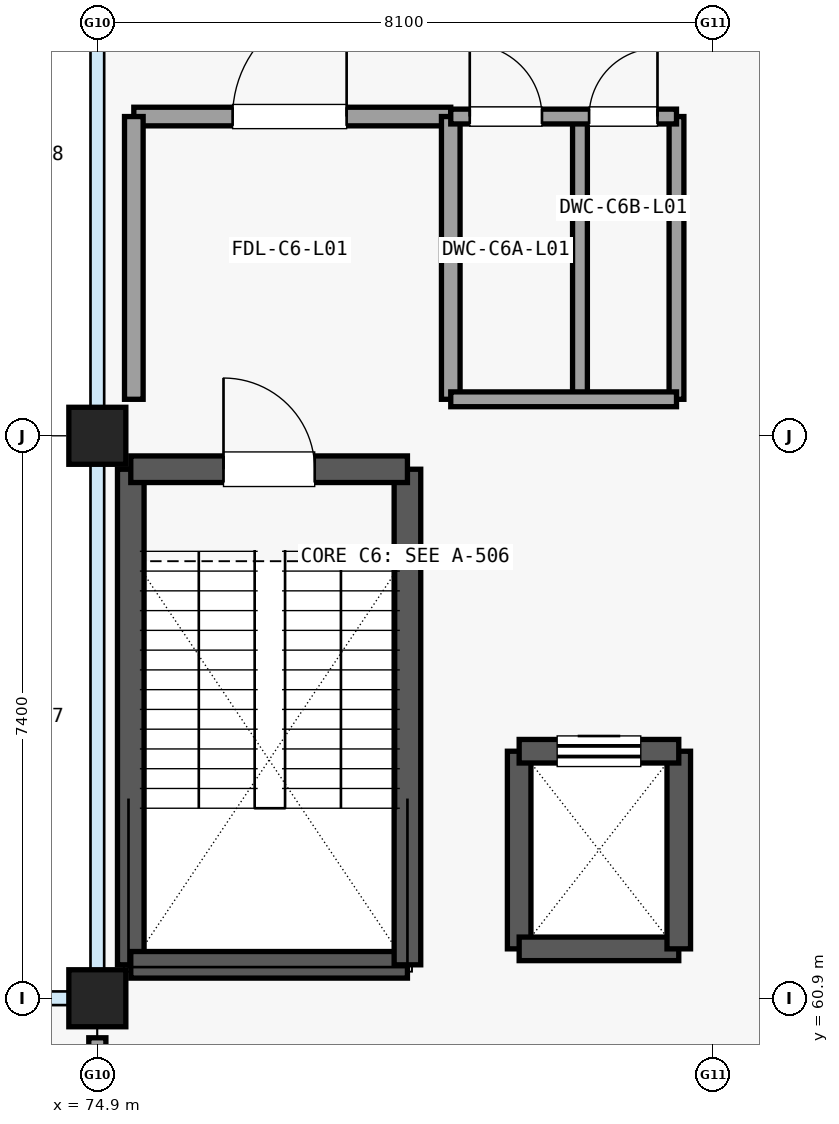
"""IFC4 building model, lengths in metres.
Left out: names, types, materials, properties, quantities, classifications, styles, units other than length and angle.
Written with IfcOpenShell. Run it as: python <this file> out.ifc"""

import sys

from ifc_helpers import new_model, si_unit, direction, frame, frame_2d, origin, origin_2d, place, context, subcontext, project, spatial, rectangle, extrude, element, fill, save


model = new_model("IFC4")
c1 = context("Model", 3, precision=1e-05, world=origin(), true_north=direction((0.0, 1.0)))
c2 = subcontext(c1, "Body", "Model", "MODEL_VIEW")
j1 = project(units=[si_unit("LENGTHUNIT", "METRE"), si_unit("PLANEANGLEUNIT", "RADIAN")], contexts=[c1])
p1 = place(None, origin())
s1 = spatial("IfcSite", under=j1, at=p1, CompositionType="ELEMENT")
p2 = place(p1, origin())
s2 = spatial("IfcBuilding", under=s1, at=p2, CompositionType="ELEMENT")
p3 = place(p2, frame((0.0, 0.0, 5.4)))
s3 = spatial("IfcBuildingStorey", under=s2, at=p3, CompositionType="ELEMENT", Elevation=5.4)
for number, where, z_axis, x_axis in (
    (1, (74.9, 60.9, 0.0), (0.0, 0.0, 1.0), (1.0, 0.0, 0.0)),
    (2, (74.9, 68.3, 0.0), (0.0, 0.0, 1.0), (1.0, 0.0, 0.0)),
):
    element("IfcColumn", number, at=place(p3, frame(where, z_axis=z_axis, x_axis=x_axis)), inside=s3, PredefinedType="COLUMN", context=c2, shape_type="SweptSolid", body=[
        extrude(rectangle(XDim=0.75, YDim=0.75, at=origin_2d()), origin(), (0.0, 0.0, 1.0), 4.56),
    ])
p4 = place(p3, frame((75.34, 61.34, 0.0), z_axis=(0.0, 0.0, 1.0), x_axis=(0.0, 1.0, 0.0)))
e3 = element("IfcWall", 3, at=p4, inside=s3, PredefinedType="SHEAR", context=c2, shape_type="SweptSolid", body=[
    extrude(rectangle(XDim=6.52, YDim=0.35, at=frame_2d((3.26, 0.0))), origin(), (0.0, 0.0, 1.0), 4.555),
])
p5 = place(p3, frame((75.34, 61.34, 0.0), z_axis=(0.0, 0.0, 1.0), x_axis=(1.0, 0.0, 0.0)))
e4 = element("IfcWall", 4, at=p5, inside=s3, PredefinedType="SHEAR", context=c2, shape_type="SweptSolid", body=[
    extrude(rectangle(XDim=3.64, YDim=0.35, at=frame_2d((1.82, 0.0))), origin(), (0.0, 0.0, 1.0), 4.555),
])
p6 = place(p3, frame((78.98, 61.34, 0.0), z_axis=(0.0, 0.0, 1.0), x_axis=(0.0, 1.0, 0.0)))
e5 = element("IfcWall", 5, at=p6, inside=s3, PredefinedType="SHEAR", context=c2, shape_type="SweptSolid", body=[
    extrude(rectangle(XDim=6.52, YDim=0.35, at=frame_2d((3.26, 0.0))), origin(), (0.0, 0.0, 1.0), 4.555),
])
p7 = place(p3, frame((75.34, 67.86, 0.0), z_axis=(0.0, 0.0, 1.0), x_axis=(1.0, 0.0, 0.0)))
e6 = element("IfcWall", 6, at=p7, inside=s3, PredefinedType="SHEAR", context=c2, shape_type="SweptSolid", body=[
    extrude(rectangle(XDim=3.64, YDim=0.35, at=frame_2d((1.82, 0.0))), origin(), (0.0, 0.0, 1.0), 4.555),
])
p8 = place(p7, frame((1.22, 0.0, 0.0)))
e7 = element("IfcOpeningElement", 7, at=p8, cuts=e6, PredefinedType="OPENING", context=c2, shape_type="SweptSolid", body=[
    extrude(rectangle(XDim=1.2, YDim=2.15, at=frame_2d((0.6, 1.075))), frame((0.0, 0.185, 0.0), z_axis=(0.0, -1.0, 0.0), x_axis=(1.0, 0.0, 0.0)), (0.0, 0.0, 1.0), 0.37),
])
p9 = place(p3, frame((80.45, 61.55, 0.0), z_axis=(0.0, 0.0, 1.0), x_axis=(0.0, 1.0, 0.0)))
e8 = element("IfcWall", 8, at=p9, inside=s3, PredefinedType="SHEAR", context=c2, shape_type="SweptSolid", body=[
    extrude(rectangle(XDim=2.6, YDim=0.31, at=frame_2d((1.3, 0.0))), origin(), (0.0, 0.0, 1.0), 4.555),
])
p10 = place(p3, frame((80.45, 61.55, 0.0), z_axis=(0.0, 0.0, 1.0), x_axis=(1.0, 0.0, 0.0)))
e9 = element("IfcWall", 9, at=p10, inside=s3, PredefinedType="SHEAR", context=c2, shape_type="SweptSolid", body=[
    extrude(rectangle(XDim=2.1, YDim=0.31, at=frame_2d((1.05, 0.0))), origin(), (0.0, 0.0, 1.0), 4.555),
])
p11 = place(p3, frame((82.55, 61.55, 0.0), z_axis=(0.0, 0.0, 1.0), x_axis=(0.0, 1.0, 0.0)))
e10 = element("IfcWall", 10, at=p11, inside=s3, PredefinedType="SHEAR", context=c2, shape_type="SweptSolid", body=[
    extrude(rectangle(XDim=2.6, YDim=0.31, at=frame_2d((1.3, 0.0))), origin(), (0.0, 0.0, 1.0), 4.555),
])
p12 = place(p3, frame((80.45, 64.15, 0.0), z_axis=(0.0, 0.0, 1.0), x_axis=(1.0, 0.0, 0.0)))
e11 = element("IfcWall", 11, at=p12, inside=s3, PredefinedType="SHEAR", context=c2, shape_type="SweptSolid", body=[
    extrude(rectangle(XDim=2.1, YDim=0.31, at=frame_2d((1.05, 0.0))), origin(), (0.0, 0.0, 1.0), 4.555),
])
p13 = place(p12, frame((0.5, 0.0, 0.0)))
e12 = element("IfcOpeningElement", 12, at=p13, cuts=e11, PredefinedType="OPENING", context=c2, shape_type="SweptSolid", body=[
    extrude(rectangle(XDim=1.1, YDim=2.15, at=frame_2d((0.55, 1.075))), frame((0.0, 0.165, 0.0), z_axis=(0.0, -1.0, 0.0), x_axis=(1.0, 0.0, 0.0)), (0.0, 0.0, 1.0), 0.33),
])
p14 = place(p3, frame((75.38, 72.5, 0.0), z_axis=(0.0, 0.0, 1.0), x_axis=(1.0, 0.0, 0.0)))
e13 = element("IfcWall", 13, at=p14, inside=s3, PredefinedType="PARTITIONING", context=c2, shape_type="SweptSolid", body=[
    extrude(rectangle(XDim=4.17, YDim=0.245, at=frame_2d((2.085, 0.0))), origin(), (0.0, 0.0, 1.0), 3.627),
])
p15 = place(p14, frame((1.3, 0.0, 0.0)))
e14 = element("IfcOpeningElement", 14, at=p15, cuts=e13, PredefinedType="OPENING", context=c2, shape_type="SweptSolid", body=[
    extrude(rectangle(XDim=1.5, YDim=2.15, at=frame_2d((0.75, 1.075))), frame((0.0, 0.133, 0.0), z_axis=(0.0, -1.0, 0.0), x_axis=(1.0, 0.0, 0.0)), (0.0, 0.0, 1.0), 0.265),
])
for number, where, z_axis, x_axis in (
    (15, (75.38, 68.78, 0.0), (0.0, 0.0, 1.0), (0.0, 1.0, 0.0)),
    (16, (79.55, 68.78, 0.0), (0.0, 0.0, 1.0), (0.0, 1.0, 0.0)),
):
    element("IfcWall", number, at=place(p3, frame(where, z_axis=z_axis, x_axis=x_axis)), inside=s3, PredefinedType="PARTITIONING", context=c2, shape_type="SweptSolid", body=[
        extrude(rectangle(XDim=3.72, YDim=0.245, at=frame_2d((1.86, 0.0))), origin(), (0.0, 0.0, 1.0), 3.627),
    ])
for number, where, z_axis, x_axis in (
    (17, (81.25, 68.78, 0.0), (0.0, 0.0, 1.0), (0.0, 1.0, 0.0)),
    (18, (82.52, 68.78, 0.0), (0.0, 0.0, 1.0), (0.0, 1.0, 0.0)),
):
    element("IfcWall", number, at=place(p3, frame(where, z_axis=z_axis, x_axis=x_axis)), inside=s3, PredefinedType="PARTITIONING", context=c2, shape_type="SweptSolid", body=[
        extrude(rectangle(XDim=3.72, YDim=0.195, at=frame_2d((1.86, 0.0))), origin(), (0.0, 0.0, 1.0), 3.627),
    ])
p16 = place(p3, frame((79.55, 68.78, 0.0), z_axis=(0.0, 0.0, 1.0), x_axis=(1.0, 0.0, 0.0)))
e19 = element("IfcWall", 19, at=p16, inside=s3, PredefinedType="PARTITIONING", context=c2, shape_type="SweptSolid", body=[
    extrude(rectangle(XDim=2.97, YDim=0.195, at=frame_2d((1.485, 0.0))), origin(), (0.0, 0.0, 1.0), 3.627),
])
p17 = place(p3, frame((79.55, 72.5, 0.0), z_axis=(0.0, 0.0, 1.0), x_axis=(1.0, 0.0, 0.0)))
e20 = element("IfcWall", 20, at=p17, inside=s3, PredefinedType="PARTITIONING", context=c2, shape_type="SweptSolid", body=[
    extrude(rectangle(XDim=2.97, YDim=0.195, at=frame_2d((1.485, 0.0))), origin(), (0.0, 0.0, 1.0), 3.627),
])
p18 = place(p17, frame((0.25, 0.0, 0.0)))
e21 = element("IfcOpeningElement", 21, at=p18, cuts=e20, PredefinedType="OPENING", context=c2, shape_type="SweptSolid", body=[
    extrude(rectangle(XDim=0.95, YDim=2.1, at=frame_2d((0.475, 1.05))), frame((0.0, 0.107, 0.0), z_axis=(0.0, -1.0, 0.0), x_axis=(1.0, 0.0, 0.0)), (0.0, 0.0, 1.0), 0.215),
])
p19 = place(p17, frame((1.82, 0.0, 0.0)))
e22 = element("IfcOpeningElement", 22, at=p19, cuts=e20, PredefinedType="OPENING", context=c2, shape_type="SweptSolid", body=[
    extrude(rectangle(XDim=0.9, YDim=2.1, at=frame_2d((0.45, 1.05))), frame((0.0, 0.107, 0.0), z_axis=(0.0, -1.0, 0.0), x_axis=(1.0, 0.0, 0.0)), (0.0, 0.0, 1.0), 0.215),
])
p20 = place(p3, frame((74.9, 54.02, 0.0), z_axis=(0.0, 0.0, 1.0), x_axis=(0.0, 1.0, 0.0)))
e23 = element("IfcWall", 23, at=p20, inside=s3, PredefinedType="PARTITIONING", context=c2, shape_type="SweptSolid", body=[
    extrude(rectangle(XDim=6.36, YDim=0.225, at=frame_2d((3.18, 0.0))), origin(), (0.0, 0.0, 1.0), 3.627),
])
p21 = place(p20, frame((2.255, 0.0, 0.0)))
e24 = element("IfcOpeningElement", 24, at=p21, cuts=e23, PredefinedType="OPENING", context=c2, shape_type="SweptSolid", body=[
    extrude(rectangle(XDim=1.85, YDim=2.4, at=frame_2d((0.925, 1.2))), frame((0.0, 0.123, 0.0), z_axis=(0.0, -1.0, 0.0), x_axis=(1.0, 0.0, 0.0)), (0.0, 0.0, 1.0), 0.245),
])
p22 = place(p8, origin())
e25 = element("IfcDoor", 25, at=p22, inside=s3, OperationType="SINGLE_SWING_LEFT", PredefinedType="DOOR", context=c2, shape_type="SweptSolid", body=[
    extrude(rectangle(XDim=1.2, YDim=2.15, at=frame_2d((0.6, 1.075))), frame((0.0, 0.025, 0.0), z_axis=(0.0, -1.0, 0.0), x_axis=(1.0, 0.0, 0.0)), (0.0, 0.0, 1.0), 0.05),
])
fill(e7, e25)
p23 = place(p13, origin())
e26 = element("IfcDoor", 26, at=p23, inside=s3, OperationType="SLIDING_TO_LEFT", PredefinedType="DOOR", context=c2, shape_type="SweptSolid", body=[
    extrude(rectangle(XDim=1.1, YDim=2.15, at=frame_2d((0.55, 1.075))), frame((0.0, 0.025, 0.0), z_axis=(0.0, -1.0, 0.0), x_axis=(1.0, 0.0, 0.0)), (0.0, 0.0, 1.0), 0.05),
])
fill(e12, e26)
p24 = place(p15, origin())
e27 = element("IfcDoor", 27, at=p24, inside=s3, OperationType="SINGLE_SWING_RIGHT", PredefinedType="DOOR", context=c2, shape_type="SweptSolid", body=[
    extrude(rectangle(XDim=1.5, YDim=2.15, at=frame_2d((0.75, 1.075))), frame((0.0, 0.025, 0.0), z_axis=(0.0, -1.0, 0.0), x_axis=(1.0, 0.0, 0.0)), (0.0, 0.0, 1.0), 0.05),
])
fill(e14, e27)
p25 = place(p18, origin())
e28 = element("IfcDoor", 28, at=p25, inside=s3, OperationType="SINGLE_SWING_LEFT", PredefinedType="DOOR", context=c2, shape_type="SweptSolid", body=[
    extrude(rectangle(XDim=0.95, YDim=2.1, at=frame_2d((0.475, 1.05))), frame((0.0, 0.025, 0.0), z_axis=(0.0, -1.0, 0.0), x_axis=(1.0, 0.0, 0.0)), (0.0, 0.0, 1.0), 0.05),
])
fill(e21, e28)
p26 = place(p19, origin())
e29 = element("IfcDoor", 29, at=p26, inside=s3, OperationType="SINGLE_SWING_RIGHT", PredefinedType="DOOR", context=c2, shape_type="SweptSolid", body=[
    extrude(rectangle(XDim=0.9, YDim=2.1, at=frame_2d((0.45, 1.05))), frame((0.0, 0.025, 0.0), z_axis=(0.0, -1.0, 0.0), x_axis=(1.0, 0.0, 0.0)), (0.0, 0.0, 1.0), 0.05),
])
fill(e22, e29)
save(model, sys.argv[1])
